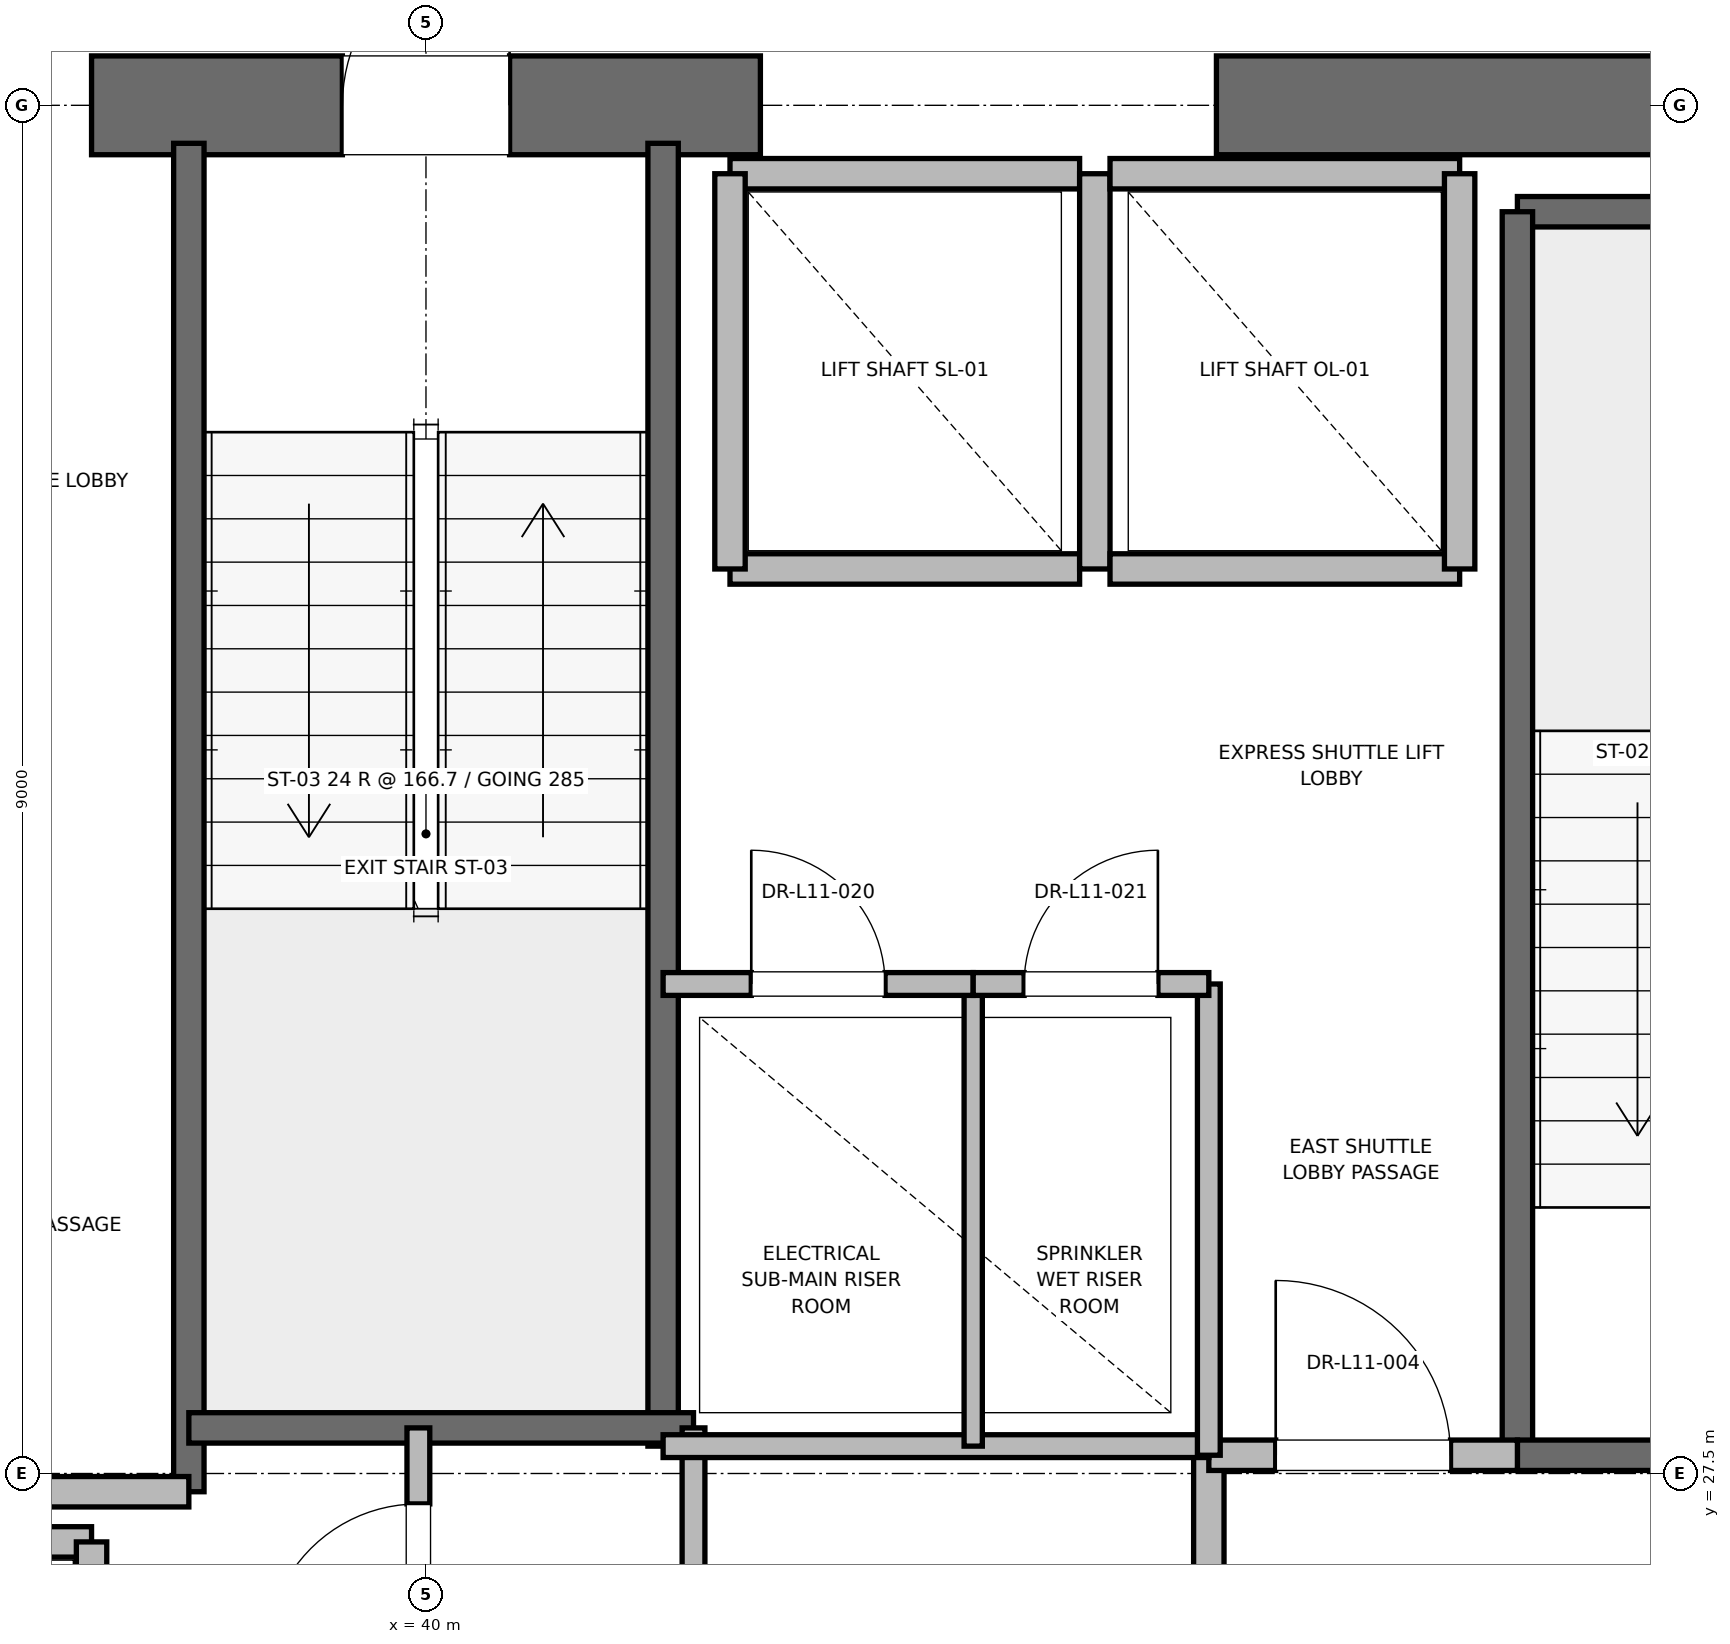
"""IFC4 building model, lengths in metres.
Left out: names, types, materials, properties, quantities, classifications, styles, units other than length and angle.
Written with IfcOpenShell. Run it as: python <this file> out.ifc"""

import sys

from ifc_helpers import new_model, si_unit, direction, frame, frame_2d, origin, place, context, subcontext, project, spatial, rectangle, extrude, element, fill, save


model = new_model("IFC4")
c1 = context("Model", 3, precision=1e-05, world=origin(), true_north=direction((0.0, 1.0)))
c2 = subcontext(c1, "Body", "Model", "MODEL_VIEW")
j1 = project(units=[si_unit("LENGTHUNIT", "METRE"), si_unit("PLANEANGLEUNIT", "RADIAN")], contexts=[c1])
p1 = place(None, origin())
s1 = spatial("IfcSite", under=j1, at=p1, CompositionType="ELEMENT")
p2 = place(p1, origin())
s2 = spatial("IfcBuilding", under=s1, at=p2, CompositionType="ELEMENT")
p3 = place(p2, frame((0.0, 0.0, 51.6)))
s3 = spatial("IfcBuildingStorey", under=s2, at=p3, CompositionType="ELEMENT", Elevation=51.6)
p4 = place(p3, frame((37.8, 36.5, 0.0), z_axis=(0.0, 0.0, 1.0), x_axis=(1.0, 0.0, 0.0)))
e1 = element("IfcWall", 1, at=p4, inside=s3, PredefinedType="SHEAR", context=c2, shape_type="SweptSolid", body=[
    extrude(rectangle(XDim=4.4, YDim=0.65, at=frame_2d((2.2, 0.0))), origin(), (0.0, 0.0, 1.0), 3.76),
])
p5 = place(p4, frame((1.65, 0.0, 0.0)))
e2 = element("IfcOpeningElement", 2, at=p5, cuts=e1, PredefinedType="OPENING", context=c2, shape_type="SweptSolid", body=[
    extrude(rectangle(XDim=1.1, YDim=2.15, at=frame_2d((0.55, 1.075))), frame((0.0, 0.325, 0.0), z_axis=(0.0, -1.0, 0.0), x_axis=(1.0, 0.0, 0.0)), (0.0, 0.0, 1.0), 0.65),
])
p6 = place(p3, frame((45.2, 36.5, 0.0), z_axis=(0.0, 0.0, 1.0), x_axis=(1.0, 0.0, 0.0)))
e3 = element("IfcWall", 3, at=p6, inside=s3, PredefinedType="SHEAR", context=c2, shape_type="SweptSolid", body=[
    extrude(rectangle(XDim=5.8, YDim=0.65, at=frame_2d((2.9, 0.0))), origin(), (0.0, 0.0, 1.0), 3.76),
])
p7 = place(p3, frame((47.18, 35.8, 0.0), z_axis=(0.0, 0.0, 1.0), x_axis=(1.0, 0.0, 0.0)))
e4 = element("IfcWall", 4, at=p7, inside=s3, PredefinedType="SOLIDWALL", context=c2, shape_type="SweptSolid", body=[
    extrude(rectangle(XDim=3.12, YDim=0.2, at=frame_2d((1.56, 0.0))), origin(), (0.0, 0.0, 1.0), 3.76),
])
p8 = place(p3, frame((47.18, 27.62, 0.0), z_axis=(0.0, 0.0, 1.0), x_axis=(0.0, 1.0, 0.0)))
e5 = element("IfcWall", 5, at=p8, inside=s3, PredefinedType="SOLIDWALL", context=c2, shape_type="SweptSolid", body=[
    extrude(rectangle(XDim=8.18, YDim=0.2, at=frame_2d((4.09, 0.0))), origin(), (0.0, 0.0, 1.0), 3.76),
])
p9 = place(p3, frame((47.18, 27.62, 0.0), z_axis=(0.0, 0.0, 1.0), x_axis=(1.0, 0.0, 0.0)))
e6 = element("IfcWall", 6, at=p9, inside=s3, PredefinedType="SOLIDWALL", context=c2, shape_type="SweptSolid", body=[
    extrude(rectangle(XDim=3.12, YDim=0.2, at=frame_2d((1.56, 0.0))), origin(), (0.0, 0.0, 1.0), 3.76),
])
p10 = place(p9, frame((1.01, 0.0, 0.0)))
e7 = element("IfcOpeningElement", 7, at=p10, cuts=e6, PredefinedType="OPENING", context=c2, shape_type="SweptSolid", body=[
    extrude(rectangle(XDim=1.1, YDim=2.15, at=frame_2d((0.55, 1.075))), frame((0.0, 0.1, 0.0), z_axis=(0.0, -1.0, 0.0), x_axis=(1.0, 0.0, 0.0)), (0.0, 0.0, 1.0), 0.2),
])
p11 = place(p3, frame((38.44, 27.38, 0.0), z_axis=(0.0, 0.0, 1.0), x_axis=(0.0, 1.0, 0.0)))
e8 = element("IfcWall", 8, at=p11, inside=s3, PredefinedType="SOLIDWALL", context=c2, shape_type="SweptSolid", body=[
    extrude(rectangle(XDim=8.87, YDim=0.2, at=frame_2d((4.435, 0.0))), origin(), (0.0, 0.0, 1.0), 3.76),
])
p12 = place(p3, frame((41.56, 27.68, 0.0), z_axis=(0.0, 0.0, 1.0), x_axis=(0.0, 1.0, 0.0)))
e9 = element("IfcWall", 9, at=p12, inside=s3, PredefinedType="SOLIDWALL", context=c2, shape_type="SweptSolid", body=[
    extrude(rectangle(XDim=8.57, YDim=0.2, at=frame_2d((4.285, 0.0))), origin(), (0.0, 0.0, 1.0), 3.76),
])
p13 = place(p3, frame((38.44, 27.8, 0.0), z_axis=(0.0, 0.0, 1.0), x_axis=(1.0, 0.0, 0.0)))
e10 = element("IfcWall", 10, at=p13, inside=s3, PredefinedType="SOLIDWALL", context=c2, shape_type="SweptSolid", body=[
    extrude(rectangle(XDim=3.32, YDim=0.2, at=frame_2d((1.66, 0.0))), origin(), (0.0, 0.0, 1.0), 3.76),
])
p14 = place(p3, frame((32.82, 27.38, 0.0), z_axis=(0.0, 0.0, 1.0), x_axis=(1.0, 0.0, 0.0)))
e11 = element("IfcWall", 11, at=p14, inside=s3, PredefinedType="PARTITIONING", context=c2, shape_type="SweptSolid", body=[
    extrude(rectangle(XDim=5.62, YDim=0.2, at=frame_2d((2.81, 0.0))), origin(), (0.0, 0.0, 1.0), 3.76),
])
p15 = place(p3, frame((45.15, 24.25, 0.0), z_axis=(0.0, 0.0, 1.0), x_axis=(0.0, 1.0, 0.0)))
e12 = element("IfcWall", 12, at=p15, inside=s3, PredefinedType="PARTITIONING", context=c2, shape_type="SweptSolid", body=[
    extrude(rectangle(XDim=3.37, YDim=0.2, at=frame_2d((1.685, 0.0))), origin(), (0.0, 0.0, 1.0), 3.76),
])
p16 = place(p3, frame((45.15, 27.62, 0.0), z_axis=(0.0, 0.0, 1.0), x_axis=(1.0, 0.0, 0.0)))
e13 = element("IfcWall", 13, at=p16, inside=s3, PredefinedType="PARTITIONING", context=c2, shape_type="SweptSolid", body=[
    extrude(rectangle(XDim=2.03, YDim=0.2, at=frame_2d((1.015, 0.0))), origin(), (0.0, 0.0, 1.0), 3.76),
])
p17 = place(p16, frame((0.44, 0.0, 0.0)))
e14 = element("IfcOpeningElement", 14, at=p17, cuts=e13, PredefinedType="OPENING", context=c2, shape_type="SweptSolid", body=[
    extrude(rectangle(XDim=1.15, YDim=2.2, at=frame_2d((0.575, 1.1))), frame((0.0, 0.1, 0.0), z_axis=(0.0, -1.0, 0.0), x_axis=(1.0, 0.0, 0.0)), (0.0, 0.0, 1.0), 0.2),
])
p18 = place(p3, frame((37.8, 27.05, 0.0), z_axis=(0.0, 0.0, 1.0), x_axis=(-1.0, 0.0, 0.0)))
e15 = element("IfcWall", 15, at=p18, inside=s3, PredefinedType="SOLIDWALL", context=c2, shape_type="SweptSolid", body=[
    extrude(rectangle(XDim=2.3, YDim=0.2, at=frame_2d((1.15, 0.0))), origin(), (0.0, 0.0, 1.0), 3.76),
])
p19 = place(p3, frame((37.8, 24.45, 0.0), z_axis=(0.0, 0.0, 1.0), x_axis=(0.0, 1.0, 0.0)))
e16 = element("IfcWall", 16, at=p19, inside=s3, PredefinedType="SOLIDWALL", context=c2, shape_type="SweptSolid", body=[
    extrude(rectangle(XDim=2.6, YDim=0.2, at=frame_2d((1.3, 0.0))), origin(), (0.0, 0.0, 1.0), 3.76),
])
p20 = place(p3, frame((42.0, 33.45, 0.0), z_axis=(0.0, 0.0, 1.0), x_axis=(1.0, 0.0, 0.0)))
e17 = element("IfcWall", 17, at=p20, inside=s3, PredefinedType="SOLIDWALL", context=c2, shape_type="SweptSolid", body=[
    extrude(rectangle(XDim=2.3, YDim=0.2, at=frame_2d((1.15, 0.0))), origin(), (0.0, 0.0, 1.0), 3.76),
])
p21 = place(p3, frame((44.3, 36.05, 0.0), z_axis=(0.0, 0.0, 1.0), x_axis=(-1.0, 0.0, 0.0)))
e18 = element("IfcWall", 18, at=p21, inside=s3, PredefinedType="SOLIDWALL", context=c2, shape_type="SweptSolid", body=[
    extrude(rectangle(XDim=2.3, YDim=0.2, at=frame_2d((1.15, 0.0))), origin(), (0.0, 0.0, 1.0), 2.54),
])
for number, where, z_axis, x_axis in (
    (19, (42.0, 36.05, 0.0), (0.0, 0.0, 1.0), (0.0, -1.0, 0.0)),
    (20, (44.4, 33.45, 0.0), (0.0, 0.0, 1.0), (0.0, 1.0, 0.0)),
):
    element("IfcWall", number, at=place(p3, frame(where, z_axis=z_axis, x_axis=x_axis)), inside=s3, PredefinedType="SOLIDWALL", context=c2, shape_type="SweptSolid", body=[
        extrude(rectangle(XDim=2.6, YDim=0.2, at=frame_2d((1.3, 0.0))), origin(), (0.0, 0.0, 1.0), 2.54),
    ])
p22 = place(p3, frame((44.5, 33.45, 0.0), z_axis=(0.0, 0.0, 1.0), x_axis=(1.0, 0.0, 0.0)))
e21 = element("IfcWall", 21, at=p22, inside=s3, PredefinedType="SOLIDWALL", context=c2, shape_type="SweptSolid", body=[
    extrude(rectangle(XDim=2.3, YDim=0.2, at=frame_2d((1.15, 0.0))), origin(), (0.0, 0.0, 1.0), 3.76),
])
p23 = place(p3, frame((46.8, 36.05, 0.0), z_axis=(0.0, 0.0, 1.0), x_axis=(-1.0, 0.0, 0.0)))
e22 = element("IfcWall", 22, at=p23, inside=s3, PredefinedType="SOLIDWALL", context=c2, shape_type="SweptSolid", body=[
    extrude(rectangle(XDim=2.3, YDim=0.2, at=frame_2d((1.15, 0.0))), origin(), (0.0, 0.0, 1.0), 2.54),
])
p24 = place(p3, frame((46.8, 33.45, 0.0), z_axis=(0.0, 0.0, 1.0), x_axis=(0.0, 1.0, 0.0)))
e23 = element("IfcWall", 23, at=p24, inside=s3, PredefinedType="SOLIDWALL", context=c2, shape_type="SweptSolid", body=[
    extrude(rectangle(XDim=2.6, YDim=0.2, at=frame_2d((1.3, 0.0))), origin(), (0.0, 0.0, 1.0), 3.76),
])
p25 = place(p3, frame((41.76, 23.8, 0.0), z_axis=(0.0, 0.0, 1.0), x_axis=(0.0, 1.0, 0.0)))
e24 = element("IfcWall", 24, at=p25, inside=s3, PredefinedType="PARTITIONING", context=c2, shape_type="SweptSolid", body=[
    extrude(rectangle(XDim=4.0, YDim=0.15, at=frame_2d((2.0, 0.0))), origin(), (0.0, 0.0, 1.0), 2.85),
])
p26 = place(p3, frame((39.95, 25.8, 0.0), z_axis=(0.0, 0.0, 1.0), x_axis=(0.0, 1.0, 0.0)))
e25 = element("IfcWall", 25, at=p26, inside=s3, PredefinedType="PARTITIONING", context=c2, shape_type="SweptSolid", body=[
    extrude(rectangle(XDim=2.0, YDim=0.15, at=frame_2d((1.0, 0.0))), origin(), (0.0, 0.0, 1.0), 2.85),
])
p27 = place(p26, frame((0.5, 0.0, 0.0)))
e26 = element("IfcOpeningElement", 26, at=p27, cuts=e25, PredefinedType="OPENING", context=c2, shape_type="SweptSolid", body=[
    extrude(rectangle(XDim=1.0, YDim=2.15, at=frame_2d((0.5, 1.075))), frame((0.0, 0.075, 0.0), z_axis=(0.0, -1.0, 0.0), x_axis=(1.0, 0.0, 0.0)), (0.0, 0.0, 1.0), 0.15),
])
p28 = place(p3, frame((41.56, 27.68, 0.0), z_axis=(0.0, 0.0, 1.0), x_axis=(1.0, 0.0, 0.0)))
e27 = element("IfcWall", 27, at=p28, inside=s3, PredefinedType="PARTITIONING", context=c2, shape_type="SweptSolid", body=[
    extrude(rectangle(XDim=3.59, YDim=0.15, at=frame_2d((1.795, 0.0))), origin(), (0.0, 0.0, 1.0), 2.85),
])
p29 = place(p3, frame((45.15, 27.62, 0.0), z_axis=(0.0, 0.0, 1.0), x_axis=(0.0, 1.0, 0.0)))
e28 = element("IfcWall", 28, at=p29, inside=s3, PredefinedType="PARTITIONING", context=c2, shape_type="SweptSolid", body=[
    extrude(rectangle(XDim=3.1, YDim=0.15, at=frame_2d((1.55, 0.0))), origin(), (0.0, 0.0, 1.0), 2.85),
])
p30 = place(p3, frame((43.6, 27.68, 0.0), z_axis=(0.0, 0.0, 1.0), x_axis=(0.0, 1.0, 0.0)))
e29 = element("IfcWall", 29, at=p30, inside=s3, PredefinedType="PARTITIONING", context=c2, shape_type="SweptSolid", body=[
    extrude(rectangle(XDim=3.04, YDim=0.12, at=frame_2d((1.52, 0.0))), origin(), (0.0, 0.0, 1.0), 2.85),
])
p31 = place(p3, frame((41.56, 30.72, 0.0), z_axis=(0.0, 0.0, 1.0), x_axis=(1.0, 0.0, 0.0)))
e30 = element("IfcWall", 30, at=p31, inside=s3, PredefinedType="PARTITIONING", context=c2, shape_type="SweptSolid", body=[
    extrude(rectangle(XDim=2.04, YDim=0.15, at=frame_2d((1.02, 0.0))), origin(), (0.0, 0.0, 1.0), 2.85),
])
p32 = place(p31, frame((0.58, 0.0, 0.0)))
e31 = element("IfcOpeningElement", 31, at=p32, cuts=e30, PredefinedType="OPENING", context=c2, shape_type="SweptSolid", body=[
    extrude(rectangle(XDim=0.88, YDim=2.1, at=frame_2d((0.44, 1.05))), frame((0.0, 0.075, 0.0), z_axis=(0.0, -1.0, 0.0), x_axis=(1.0, 0.0, 0.0)), (0.0, 0.0, 1.0), 0.15),
])
p33 = place(p3, frame((43.6, 30.72, 0.0), z_axis=(0.0, 0.0, 1.0), x_axis=(1.0, 0.0, 0.0)))
e32 = element("IfcWall", 32, at=p33, inside=s3, PredefinedType="PARTITIONING", context=c2, shape_type="SweptSolid", body=[
    extrude(rectangle(XDim=1.55, YDim=0.15, at=frame_2d((0.775, 0.0))), origin(), (0.0, 0.0, 1.0), 2.85),
])
p34 = place(p33, frame((0.335, 0.0, 0.0)))
e33 = element("IfcOpeningElement", 33, at=p34, cuts=e32, PredefinedType="OPENING", context=c2, shape_type="SweptSolid", body=[
    extrude(rectangle(XDim=0.88, YDim=2.1, at=frame_2d((0.44, 1.05))), frame((0.0, 0.075, 0.0), z_axis=(0.0, -1.0, 0.0), x_axis=(1.0, 0.0, 0.0)), (0.0, 0.0, 1.0), 0.15),
])
p35 = place(p5, origin())
e34 = element("IfcDoor", 34, at=p35, inside=s3, OperationType="SINGLE_SWING_RIGHT", PredefinedType="DOOR", context=c2, shape_type="SweptSolid", body=[
    extrude(rectangle(XDim=1.1, YDim=2.15, at=frame_2d((0.55, 1.075))), frame((0.0, 0.025, 0.0), z_axis=(0.0, -1.0, 0.0), x_axis=(1.0, 0.0, 0.0)), (0.0, 0.0, 1.0), 0.05),
])
fill(e2, e34)
p36 = place(p17, origin())
e35 = element("IfcDoor", 35, at=p36, inside=s3, OperationType="SINGLE_SWING_LEFT", PredefinedType="DOOR", context=c2, shape_type="SweptSolid", body=[
    extrude(rectangle(XDim=1.15, YDim=2.2, at=frame_2d((0.575, 1.1))), frame((0.0, 0.025, 0.0), z_axis=(0.0, -1.0, 0.0), x_axis=(1.0, 0.0, 0.0)), (0.0, 0.0, 1.0), 0.05),
])
fill(e14, e35)
p37 = place(p27, origin())
e36 = element("IfcDoor", 36, at=p37, inside=s3, OperationType="SINGLE_SWING_LEFT", PredefinedType="DOOR", context=c2, shape_type="SweptSolid", body=[
    extrude(rectangle(XDim=1.0, YDim=2.15, at=frame_2d((0.5, 1.075))), frame((0.0, 0.025, 0.0), z_axis=(0.0, -1.0, 0.0), x_axis=(1.0, 0.0, 0.0)), (0.0, 0.0, 1.0), 0.05),
])
fill(e26, e36)
p38 = place(p32, origin())
e37 = element("IfcDoor", 37, at=p38, inside=s3, OperationType="SINGLE_SWING_LEFT", PredefinedType="DOOR", context=c2, shape_type="SweptSolid", body=[
    extrude(rectangle(XDim=0.88, YDim=2.1, at=frame_2d((0.44, 1.05))), frame((0.0, 0.025, 0.0), z_axis=(0.0, -1.0, 0.0), x_axis=(1.0, 0.0, 0.0)), (0.0, 0.0, 1.0), 0.05),
])
fill(e31, e37)
p39 = place(p34, origin())
e38 = element("IfcDoor", 38, at=p39, inside=s3, OperationType="SINGLE_SWING_RIGHT", PredefinedType="DOOR", context=c2, shape_type="SweptSolid", body=[
    extrude(rectangle(XDim=0.88, YDim=2.1, at=frame_2d((0.44, 1.05))), frame((0.0, 0.025, 0.0), z_axis=(0.0, -1.0, 0.0), x_axis=(1.0, 0.0, 0.0)), (0.0, 0.0, 1.0), 0.05),
])
fill(e33, e38)
save(model, sys.argv[1])
